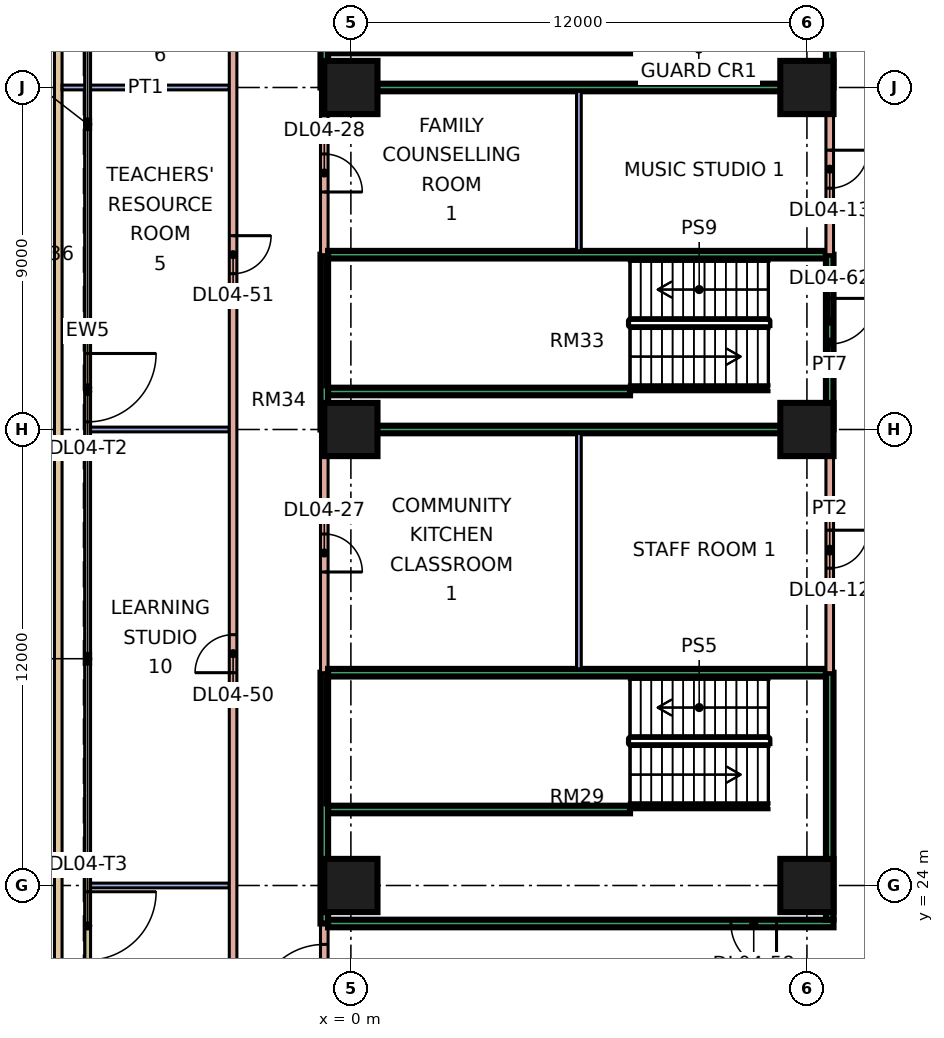
"""IFC4 building model, lengths in metres.
Left out: names, types, materials, properties, quantities, classifications, styles, units other than length and angle.
Written with IfcOpenShell. Run it as: python <this file> out.ifc"""

import sys

from ifc_helpers import new_model, si_unit, direction, frame, frame_2d, origin, origin_2d, place, context, subcontext, project, spatial, rectangle, extrude, element, fill, save


model = new_model("IFC4")
c1 = context("Model", 3, precision=1e-05, world=origin(), true_north=direction((0.0, 1.0)))
c2 = subcontext(c1, "Body", "Model", "MODEL_VIEW")
j1 = project(units=[si_unit("LENGTHUNIT", "METRE"), si_unit("PLANEANGLEUNIT", "RADIAN")], contexts=[c1])
p1 = place(None, origin())
s1 = spatial("IfcSite", under=j1, at=p1, CompositionType="ELEMENT")
p2 = place(p1, origin())
s2 = spatial("IfcBuilding", under=s1, at=p2, CompositionType="ELEMENT")
p3 = place(p2, frame((0.0, 0.0, 21.6)))
s3 = spatial("IfcBuildingStorey", under=s2, at=p3, CompositionType="ELEMENT", Elevation=21.6)
for number, where, z_axis, x_axis in (
    (1, (0.0, 24.0, 0.0), (0.0, 0.0, 1.0), (1.0, 0.0, 0.0)),
    (2, (12.0, 24.0, 0.0), (0.0, 0.0, 1.0), (1.0, 0.0, 0.0)),
    (3, (0.0, 36.0, 0.0), (0.0, 0.0, 1.0), (1.0, 0.0, 0.0)),
    (4, (12.0, 36.0, 0.0), (0.0, 0.0, 1.0), (1.0, 0.0, 0.0)),
    (5, (0.0, 45.0, 0.0), (0.0, 0.0, 1.0), (1.0, 0.0, 0.0)),
    (6, (12.0, 45.0, 0.0), (0.0, 0.0, 1.0), (1.0, 0.0, 0.0)),
):
    element("IfcColumn", number, at=place(p3, frame(where, z_axis=z_axis, x_axis=x_axis)), inside=s3, PredefinedType="COLUMN", context=c2, shape_type="SweptSolid", body=[
        extrude(rectangle(XDim=1.4, YDim=1.4, at=origin_2d()), origin(), (0.0, 0.0, 1.0), 4.8),
    ])
p4 = place(p3, frame((-6.925, 38.5, 0.0), z_axis=(0.0, 0.0, 1.0), x_axis=(0.0, -1.0, 0.0)))
e7 = element("IfcWall", 7, at=p4, inside=s3, PredefinedType="SOLIDWALL", context=c2, shape_type="SweptSolid", body=[
    extrude(rectangle(XDim=3.0, YDim=0.15, at=frame_2d((1.5, 0.0))), origin(), (0.0, 0.0, 1.0), 4.4),
])
p5 = place(p4, frame((0.5, 0.0, 0.0)))
e8 = element("IfcOpeningElement", 8, at=p5, cuts=e7, PredefinedType="OPENING", context=c2, shape_type="SweptSolid", body=[
    extrude(rectangle(XDim=1.8, YDim=2.4, at=frame_2d((0.9, 1.2))), frame((0.0, 0.085, 0.0), z_axis=(0.0, -1.0, 0.0), x_axis=(1.0, 0.0, 0.0)), (0.0, 0.0, 1.0), 0.17),
])
p6 = place(p3, frame((-6.925, 24.436, 0.0), z_axis=(0.0, 0.0, 1.0), x_axis=(0.0, -1.0, 0.0)))
e9 = element("IfcWall", 9, at=p6, inside=s3, PredefinedType="SOLIDWALL", context=c2, shape_type="SweptSolid", body=[
    extrude(rectangle(XDim=3.0, YDim=0.15, at=frame_2d((1.5, 0.0))), origin(), (0.0, 0.0, 1.0), 4.4),
])
p7 = place(p6, frame((0.6, 0.0, 0.0)))
e10 = element("IfcOpeningElement", 10, at=p7, cuts=e9, PredefinedType="OPENING", context=c2, shape_type="SweptSolid", body=[
    extrude(rectangle(XDim=1.8, YDim=2.4, at=frame_2d((0.9, 1.2))), frame((0.0, 0.085, 0.0), z_axis=(0.0, -1.0, 0.0), x_axis=(1.0, 0.0, 0.0)), (0.0, 0.0, 1.0), 0.17),
])
p8 = place(p3, frame((-7.7, 9.932, 0.0), z_axis=(0.0, 0.0, 1.0), x_axis=(0.0, 1.0, 0.0)))
e11 = element("IfcWall", 11, at=p8, inside=s3, PredefinedType="PARAPET", context=c2, shape_type="SweptSolid", body=[
    extrude(rectangle(XDim=54.136, YDim=0.2, at=frame_2d((27.068, 0.0))), origin(), (0.0, 0.0, 1.0), 0.5),
])
p9 = place(p3, frame((-7.6, 45.0, 0.0), z_axis=(0.0, 0.0, 1.0), x_axis=(1.0, 0.0, 0.0)))
e12 = element("IfcWall", 12, at=p9, inside=s3, PredefinedType="PARTITIONING", context=c2, shape_type="SweptSolid", body=[
    extrude(rectangle(XDim=4.4, YDim=0.125, at=frame_2d((2.2, 0.0))), origin(), (0.0, 0.0, 1.0), 4.4),
])
for number, where, z_axis, x_axis in (
    (13, (-6.851, 24.0, 0.0), (0.0, 0.0, 1.0), (1.0, 0.0, 0.0)),
    (14, (-6.851, 36.0, 0.0), (0.0, 0.0, 1.0), (1.0, 0.0, 0.0)),
):
    element("IfcWall", number, at=place(p3, frame(where, z_axis=z_axis, x_axis=x_axis)), inside=s3, PredefinedType="PARTITIONING", context=c2, shape_type="SweptSolid", body=[
        extrude(rectangle(XDim=3.651, YDim=0.125, at=frame_2d((1.826, 0.0))), origin(), (0.0, 0.0, 1.0), 4.4),
    ])
p10 = place(p3, frame((-3.1, 5.473, 0.0), z_axis=(0.0, 0.0, 1.0), x_axis=(0.0, 1.0, 0.0)))
e15 = element("IfcWall", 15, at=p10, inside=s3, PredefinedType="PARTITIONING", context=c2, shape_type="SweptSolid", body=[
    extrude(rectangle(XDim=60.727, YDim=0.2, at=frame_2d((30.363, 0.0))), origin(), (0.0, 0.0, 1.0), 4.4),
])
p11 = place(p10, frame((12.127, 0.0, 0.0)))
e16 = element("IfcOpeningElement", 16, at=p11, cuts=e15, PredefinedType="OPENING", context=c2, shape_type="SweptSolid", body=[
    extrude(rectangle(XDim=1.0, YDim=2.1, at=frame_2d((0.5, 1.05))), frame((0.0, 0.11, 0.0), z_axis=(0.0, -1.0, 0.0), x_axis=(1.0, 0.0, 0.0)), (0.0, 0.0, 1.0), 0.22),
])
p12 = place(p10, frame((24.127, 0.0, 0.0)))
e17 = element("IfcOpeningElement", 17, at=p12, cuts=e15, PredefinedType="OPENING", context=c2, shape_type="SweptSolid", body=[
    extrude(rectangle(XDim=1.0, YDim=2.1, at=frame_2d((0.5, 1.05))), frame((0.0, 0.11, 0.0), z_axis=(0.0, -1.0, 0.0), x_axis=(1.0, 0.0, 0.0)), (0.0, 0.0, 1.0), 0.22),
])
p13 = place(p10, frame((34.627, 0.0, 0.0)))
e18 = element("IfcOpeningElement", 18, at=p13, cuts=e15, PredefinedType="OPENING", context=c2, shape_type="SweptSolid", body=[
    extrude(rectangle(XDim=1.0, YDim=2.1, at=frame_2d((0.5, 1.05))), frame((0.0, 0.11, 0.0), z_axis=(0.0, -1.0, 0.0), x_axis=(1.0, 0.0, 0.0)), (0.0, 0.0, 1.0), 0.22),
])
p14 = place(p10, frame((43.627, 0.0, 0.0)))
e19 = element("IfcOpeningElement", 19, at=p14, cuts=e15, PredefinedType="OPENING", context=c2, shape_type="SweptSolid", body=[
    extrude(rectangle(XDim=1.0, YDim=2.1, at=frame_2d((0.5, 1.05))), frame((0.0, 0.11, 0.0), z_axis=(0.0, -1.0, 0.0), x_axis=(1.0, 0.0, 0.0)), (0.0, 0.0, 1.0), 0.22),
])
p15 = place(p10, frame((52.627, 0.0, 0.0)))
e20 = element("IfcOpeningElement", 20, at=p15, cuts=e15, PredefinedType="OPENING", context=c2, shape_type="SweptSolid", body=[
    extrude(rectangle(XDim=1.0, YDim=2.1, at=frame_2d((0.5, 1.05))), frame((0.0, 0.11, 0.0), z_axis=(0.0, -1.0, 0.0), x_axis=(1.0, 0.0, 0.0)), (0.0, 0.0, 1.0), 0.22),
])
p16 = place(p3, frame((-0.7, 3.073, 0.0), z_axis=(0.0, 0.0, 1.0), x_axis=(0.0, 1.0, 0.0)))
e21 = element("IfcWall", 21, at=p16, inside=s3, PredefinedType="PARTITIONING", context=c2, shape_type="SweptSolid", body=[
    extrude(rectangle(XDim=19.927, YDim=0.2, at=frame_2d((9.963, 0.0))), origin(), (0.0, 0.0, 1.0), 4.4),
])
p17 = place(p16, frame((17.577, 0.0, 0.0)))
e22 = element("IfcOpeningElement", 22, at=p17, cuts=e21, PredefinedType="OPENING", context=c2, shape_type="SweptSolid", body=[
    extrude(rectangle(XDim=1.8, YDim=2.1, at=frame_2d((0.9, 1.05))), frame((0.0, 0.11, 0.0), z_axis=(0.0, -1.0, 0.0), x_axis=(1.0, 0.0, 0.0)), (0.0, 0.0, 1.0), 0.22),
])
p18 = place(p16, frame((9.827, 0.0, 0.0)))
e23 = element("IfcOpeningElement", 23, at=p18, cuts=e21, PredefinedType="OPENING", context=c2, shape_type="SweptSolid", body=[
    extrude(rectangle(XDim=1.0, YDim=2.1, at=frame_2d((0.5, 1.05))), frame((0.0, 0.11, 0.0), z_axis=(0.0, -1.0, 0.0), x_axis=(1.0, 0.0, 0.0)), (0.0, 0.0, 1.0), 0.22),
])
p19 = place(p3, frame((-0.7, 23.0, 0.0), z_axis=(0.0, 0.0, 1.0), x_axis=(0.0, 1.0, 0.0)))
e24 = element("IfcWall", 24, at=p19, inside=s3, PredefinedType="SOLIDWALL", context=c2, shape_type="SweptSolid", body=[
    extrude(rectangle(XDim=6.6, YDim=0.2, at=frame_2d((3.3, 0.0))), origin(), (0.0, 0.0, 1.0), 4.4),
])
p20 = place(p3, frame((-0.7, 29.6, 0.0), z_axis=(0.0, 0.0, 1.0), x_axis=(0.0, 1.0, 0.0)))
e25 = element("IfcWall", 25, at=p20, inside=s3, PredefinedType="PARTITIONING", context=c2, shape_type="SweptSolid", body=[
    extrude(rectangle(XDim=6.4, YDim=0.2, at=frame_2d((3.2, 0.0))), origin(), (0.0, 0.0, 1.0), 4.4),
])
p21 = place(p20, frame((2.65, 0.0, 0.0)))
e26 = element("IfcOpeningElement", 26, at=p21, cuts=e25, PredefinedType="OPENING", context=c2, shape_type="SweptSolid", body=[
    extrude(rectangle(XDim=1.0, YDim=2.1, at=frame_2d((0.5, 1.05))), frame((0.0, 0.11, 0.0), z_axis=(0.0, -1.0, 0.0), x_axis=(1.0, 0.0, 0.0)), (0.0, 0.0, 1.0), 0.22),
])
p22 = place(p3, frame((-0.7, 36.0, 0.0), z_axis=(0.0, 0.0, 1.0), x_axis=(0.0, 1.0, 0.0)))
e27 = element("IfcWall", 27, at=p22, inside=s3, PredefinedType="SOLIDWALL", context=c2, shape_type="SweptSolid", body=[
    extrude(rectangle(XDim=4.6, YDim=0.2, at=frame_2d((2.3, 0.0))), origin(), (0.0, 0.0, 1.0), 4.4),
])
p23 = place(p3, frame((-0.7, 40.6, 0.0), z_axis=(0.0, 0.0, 1.0), x_axis=(0.0, 1.0, 0.0)))
e28 = element("IfcWall", 28, at=p23, inside=s3, PredefinedType="PARTITIONING", context=c2, shape_type="SweptSolid", body=[
    extrude(rectangle(XDim=4.4, YDim=0.2, at=frame_2d((2.2, 0.0))), origin(), (0.0, 0.0, 1.0), 4.4),
])
p24 = place(p23, frame((1.65, 0.0, 0.0)))
e29 = element("IfcOpeningElement", 29, at=p24, cuts=e28, PredefinedType="OPENING", context=c2, shape_type="SweptSolid", body=[
    extrude(rectangle(XDim=1.0, YDim=2.1, at=frame_2d((0.5, 1.05))), frame((0.0, 0.11, 0.0), z_axis=(0.0, -1.0, 0.0), x_axis=(1.0, 0.0, 0.0)), (0.0, 0.0, 1.0), 0.22),
])
p25 = place(p3, frame((-0.7, 45.0, 0.0), z_axis=(0.0, 0.0, 1.0), x_axis=(0.0, 1.0, 0.0)))
e30 = element("IfcWall", 30, at=p25, inside=s3, PredefinedType="SOLIDWALL", context=c2, shape_type="SweptSolid", body=[
    extrude(rectangle(XDim=4.6, YDim=0.2, at=frame_2d((2.3, 0.0))), origin(), (0.0, 0.0, 1.0), 4.4),
])
p26 = place(p3, frame((-0.6, 23.0, 0.0), z_axis=(0.0, 0.0, 1.0), x_axis=(1.0, 0.0, 0.0)))
e31 = element("IfcWall", 31, at=p26, inside=s3, PredefinedType="SOLIDWALL", context=c2, shape_type="SweptSolid", body=[
    extrude(rectangle(XDim=13.3, YDim=0.2, at=frame_2d((6.65, 0.0))), origin(), (0.0, 0.0, 1.0), 4.4),
])
p27 = place(p26, frame((10.6, 0.0, 0.0)))
e32 = element("IfcOpeningElement", 32, at=p27, cuts=e31, PredefinedType="OPENING", context=c2, shape_type="SweptSolid", body=[
    extrude(rectangle(XDim=1.2, YDim=2.1, at=frame_2d((0.6, 1.05))), frame((0.0, 0.11, 0.0), z_axis=(0.0, -1.0, 0.0), x_axis=(1.0, 0.0, 0.0)), (0.0, 0.0, 1.0), 0.22),
])
for number, where, z_axis, x_axis in (
    (33, (-0.6, 29.6, 0.0), (0.0, 0.0, 1.0), (1.0, 0.0, 0.0)),
    (34, (-0.6, 36.0, 0.0), (0.0, 0.0, 1.0), (1.0, 0.0, 0.0)),
    (35, (-0.6, 40.6, 0.0), (0.0, 0.0, 1.0), (1.0, 0.0, 0.0)),
    (36, (-0.6, 45.0, 0.0), (0.0, 0.0, 1.0), (1.0, 0.0, 0.0)),
):
    element("IfcWall", number, at=place(p3, frame(where, z_axis=z_axis, x_axis=x_axis)), inside=s3, PredefinedType="SOLIDWALL", context=c2, shape_type="SweptSolid", body=[
        extrude(rectangle(XDim=13.1, YDim=0.2, at=frame_2d((6.55, 0.0))), origin(), (0.0, 0.0, 1.0), 4.4),
    ])
p28 = place(p3, frame((6.0, 29.7, 0.0), z_axis=(0.0, 0.0, 1.0), x_axis=(0.0, 1.0, 0.0)))
e37 = element("IfcWall", 37, at=p28, inside=s3, PredefinedType="PARTITIONING", context=c2, shape_type="SweptSolid", body=[
    extrude(rectangle(XDim=6.2, YDim=0.125, at=frame_2d((3.1, 0.0))), origin(), (0.0, 0.0, 1.0), 4.4),
])
p29 = place(p3, frame((6.0, 40.7, 0.0), z_axis=(0.0, 0.0, 1.0), x_axis=(0.0, 1.0, 0.0)))
e38 = element("IfcWall", 38, at=p29, inside=s3, PredefinedType="PARTITIONING", context=c2, shape_type="SweptSolid", body=[
    extrude(rectangle(XDim=4.2, YDim=0.125, at=frame_2d((2.1, 0.0))), origin(), (0.0, 0.0, 1.0), 4.4),
])
p30 = place(p3, frame((12.6, 23.1, 0.0), z_axis=(0.0, 0.0, 1.0), x_axis=(0.0, 1.0, 0.0)))
e39 = element("IfcWall", 39, at=p30, inside=s3, PredefinedType="SOLIDWALL", context=c2, shape_type="SweptSolid", body=[
    extrude(rectangle(XDim=6.5, YDim=0.2, at=frame_2d((3.25, 0.0))), origin(), (0.0, 0.0, 1.0), 4.4),
])
p31 = place(p3, frame((12.6, 29.6, 0.0), z_axis=(0.0, 0.0, 1.0), x_axis=(0.0, 1.0, 0.0)))
e40 = element("IfcWall", 40, at=p31, inside=s3, PredefinedType="PARTITIONING", context=c2, shape_type="SweptSolid", body=[
    extrude(rectangle(XDim=6.4, YDim=0.2, at=frame_2d((3.2, 0.0))), origin(), (0.0, 0.0, 1.0), 4.4),
])
p32 = place(p31, frame((2.75, 0.0, 0.0)))
e41 = element("IfcOpeningElement", 41, at=p32, cuts=e40, PredefinedType="OPENING", context=c2, shape_type="SweptSolid", body=[
    extrude(rectangle(XDim=1.0, YDim=2.1, at=frame_2d((0.5, 1.05))), frame((0.0, 0.11, 0.0), z_axis=(0.0, -1.0, 0.0), x_axis=(1.0, 0.0, 0.0)), (0.0, 0.0, 1.0), 0.22),
])
p33 = place(p3, frame((12.6, 36.0, 0.0), z_axis=(0.0, 0.0, 1.0), x_axis=(0.0, 1.0, 0.0)))
e42 = element("IfcWall", 42, at=p33, inside=s3, PredefinedType="SOLIDWALL", context=c2, shape_type="SweptSolid", body=[
    extrude(rectangle(XDim=4.6, YDim=0.2, at=frame_2d((2.3, 0.0))), origin(), (0.0, 0.0, 1.0), 4.4),
])
p34 = place(p33, frame((2.25, 0.0, 0.0)))
e43 = element("IfcOpeningElement", 43, at=p34, cuts=e42, PredefinedType="OPENING", context=c2, shape_type="SweptSolid", body=[
    extrude(rectangle(XDim=1.2, YDim=2.1, at=frame_2d((0.6, 1.05))), frame((0.0, 0.11, 0.0), z_axis=(0.0, -1.0, 0.0), x_axis=(1.0, 0.0, 0.0)), (0.0, 0.0, 1.0), 0.22),
])
p35 = place(p3, frame((12.6, 40.6, 0.0), z_axis=(0.0, 0.0, 1.0), x_axis=(0.0, 1.0, 0.0)))
e44 = element("IfcWall", 44, at=p35, inside=s3, PredefinedType="PARTITIONING", context=c2, shape_type="SweptSolid", body=[
    extrude(rectangle(XDim=4.4, YDim=0.2, at=frame_2d((2.2, 0.0))), origin(), (0.0, 0.0, 1.0), 4.4),
])
p36 = place(p35, frame((1.75, 0.0, 0.0)))
e45 = element("IfcOpeningElement", 45, at=p36, cuts=e44, PredefinedType="OPENING", context=c2, shape_type="SweptSolid", body=[
    extrude(rectangle(XDim=1.0, YDim=2.1, at=frame_2d((0.5, 1.05))), frame((0.0, 0.11, 0.0), z_axis=(0.0, -1.0, 0.0), x_axis=(1.0, 0.0, 0.0)), (0.0, 0.0, 1.0), 0.22),
])
p37 = place(p3, frame((12.6, 45.0, 0.0), z_axis=(0.0, 0.0, 1.0), x_axis=(0.0, 1.0, 0.0)))
e46 = element("IfcWall", 46, at=p37, inside=s3, PredefinedType="SOLIDWALL", context=c2, shape_type="SweptSolid", body=[
    extrude(rectangle(XDim=4.6, YDim=0.2, at=frame_2d((2.3, 0.0))), origin(), (0.0, 0.0, 1.0), 4.4),
])
p38 = place(p37, frame((2.25, 0.0, 0.0)))
e47 = element("IfcOpeningElement", 47, at=p38, cuts=e46, PredefinedType="OPENING", context=c2, shape_type="SweptSolid", body=[
    extrude(rectangle(XDim=1.2, YDim=2.1, at=frame_2d((0.6, 1.05))), frame((0.0, 0.11, 0.0), z_axis=(0.0, -1.0, 0.0), x_axis=(1.0, 0.0, 0.0)), (0.0, 0.0, 1.0), 0.22),
])
for number, where, z_axis, x_axis in (
    (48, (-0.6, 46.0, 0.0), (0.0, 0.0, 1.0), (1.0, 0.0, 0.0)),
    (49, (-0.6, 26.0, 0.0), (0.0, 0.0, 1.0), (1.0, 0.0, 0.0)),
    (50, (-0.6, 37.0, 0.0), (0.0, 0.0, 1.0), (1.0, 0.0, 0.0)),
):
    element("IfcWall", number, at=place(p3, frame(where, z_axis=z_axis, x_axis=x_axis)), inside=s3, PredefinedType="SOLIDWALL", context=c2, shape_type="SweptSolid", body=[
        extrude(rectangle(XDim=7.945, YDim=0.2, at=frame_2d((3.973, 0.0))), origin(), (0.0, 0.0, 1.0), 4.4),
    ])
p39 = place(p5, origin())
e51 = element("IfcDoor", 51, at=p39, inside=s3, OperationType="DOUBLE_DOOR_SINGLE_SWING", PredefinedType="DOOR", context=c2, shape_type="SweptSolid", body=[
    extrude(rectangle(XDim=1.8, YDim=2.4, at=frame_2d((0.9, 1.2))), frame((0.0, 0.025, 0.0), z_axis=(0.0, -1.0, 0.0), x_axis=(1.0, 0.0, 0.0)), (0.0, 0.0, 1.0), 0.05),
])
fill(e8, e51)
p40 = place(p7, origin())
e52 = element("IfcDoor", 52, at=p40, inside=s3, OperationType="DOUBLE_DOOR_SINGLE_SWING", PredefinedType="DOOR", context=c2, shape_type="SweptSolid", body=[
    extrude(rectangle(XDim=1.8, YDim=2.4, at=frame_2d((0.9, 1.2))), frame((0.0, 0.025, 0.0), z_axis=(0.0, -1.0, 0.0), x_axis=(1.0, 0.0, 0.0)), (0.0, 0.0, 1.0), 0.05),
])
fill(e10, e52)
p41 = place(p32, origin())
e53 = element("IfcDoor", 53, at=p41, inside=s3, OperationType="SINGLE_SWING_RIGHT", PredefinedType="DOOR", context=c2, shape_type="SweptSolid", body=[
    extrude(rectangle(XDim=1.0, YDim=2.1, at=frame_2d((0.5, 1.05))), frame((0.0, 0.025, 0.0), z_axis=(0.0, -1.0, 0.0), x_axis=(1.0, 0.0, 0.0)), (0.0, 0.0, 1.0), 0.05),
])
fill(e41, e53)
p42 = place(p36, origin())
e54 = element("IfcDoor", 54, at=p42, inside=s3, OperationType="SINGLE_SWING_RIGHT", PredefinedType="DOOR", context=c2, shape_type="SweptSolid", body=[
    extrude(rectangle(XDim=1.0, YDim=2.1, at=frame_2d((0.5, 1.05))), frame((0.0, 0.025, 0.0), z_axis=(0.0, -1.0, 0.0), x_axis=(1.0, 0.0, 0.0)), (0.0, 0.0, 1.0), 0.05),
])
fill(e45, e54)
p43 = place(p21, frame((1.0, 0.0, 0.0), z_axis=(0.0, 0.0, 1.0), x_axis=(-1.0, 0.0, 0.0)))
e55 = element("IfcDoor", 55, at=p43, inside=s3, OperationType="SINGLE_SWING_LEFT", PredefinedType="DOOR", context=c2, shape_type="SweptSolid", body=[
    extrude(rectangle(XDim=1.0, YDim=2.1, at=frame_2d((0.5, 1.05))), frame((0.0, 0.025, 0.0), z_axis=(0.0, -1.0, 0.0), x_axis=(1.0, 0.0, 0.0)), (0.0, 0.0, 1.0), 0.05),
])
fill(e26, e55)
p44 = place(p24, frame((1.0, 0.0, 0.0), z_axis=(0.0, 0.0, 1.0), x_axis=(-1.0, 0.0, 0.0)))
e56 = element("IfcDoor", 56, at=p44, inside=s3, OperationType="SINGLE_SWING_LEFT", PredefinedType="DOOR", context=c2, shape_type="SweptSolid", body=[
    extrude(rectangle(XDim=1.0, YDim=2.1, at=frame_2d((0.5, 1.05))), frame((0.0, 0.025, 0.0), z_axis=(0.0, -1.0, 0.0), x_axis=(1.0, 0.0, 0.0)), (0.0, 0.0, 1.0), 0.05),
])
fill(e29, e56)
p45 = place(p17, origin())
e57 = element("IfcDoor", 57, at=p45, inside=s3, OperationType="DOUBLE_DOOR_SINGLE_SWING", PredefinedType="DOOR", context=c2, shape_type="SweptSolid", body=[
    extrude(rectangle(XDim=1.8, YDim=2.1, at=frame_2d((0.9, 1.05))), frame((0.0, 0.025, 0.0), z_axis=(0.0, -1.0, 0.0), x_axis=(1.0, 0.0, 0.0)), (0.0, 0.0, 1.0), 0.05),
])
fill(e22, e57)
p46 = place(p12, origin())
e58 = element("IfcDoor", 58, at=p46, inside=s3, OperationType="SINGLE_SWING_LEFT", PredefinedType="DOOR", context=c2, shape_type="SweptSolid", body=[
    extrude(rectangle(XDim=1.0, YDim=2.1, at=frame_2d((0.5, 1.05))), frame((0.0, 0.025, 0.0), z_axis=(0.0, -1.0, 0.0), x_axis=(1.0, 0.0, 0.0)), (0.0, 0.0, 1.0), 0.05),
])
fill(e17, e58)
p47 = place(p13, origin())
e59 = element("IfcDoor", 59, at=p47, inside=s3, OperationType="SINGLE_SWING_RIGHT", PredefinedType="DOOR", context=c2, shape_type="SweptSolid", body=[
    extrude(rectangle(XDim=1.0, YDim=2.1, at=frame_2d((0.5, 1.05))), frame((0.0, 0.025, 0.0), z_axis=(0.0, -1.0, 0.0), x_axis=(1.0, 0.0, 0.0)), (0.0, 0.0, 1.0), 0.05),
])
fill(e18, e59)
p48 = place(p27, origin())
e60 = element("IfcDoor", 60, at=p48, inside=s3, OperationType="SINGLE_SWING_RIGHT", PredefinedType="DOOR", context=c2, shape_type="SweptSolid", body=[
    extrude(rectangle(XDim=1.2, YDim=2.1, at=frame_2d((0.6, 1.05))), frame((0.0, 0.025, 0.0), z_axis=(0.0, -1.0, 0.0), x_axis=(1.0, 0.0, 0.0)), (0.0, 0.0, 1.0), 0.05),
])
fill(e32, e60)
p49 = place(p34, origin())
e61 = element("IfcDoor", 61, at=p49, inside=s3, OperationType="SINGLE_SWING_RIGHT", PredefinedType="DOOR", context=c2, shape_type="SweptSolid", body=[
    extrude(rectangle(XDim=1.2, YDim=2.1, at=frame_2d((0.6, 1.05))), frame((0.0, 0.025, 0.0), z_axis=(0.0, -1.0, 0.0), x_axis=(1.0, 0.0, 0.0)), (0.0, 0.0, 1.0), 0.05),
])
fill(e43, e61)
save(model, sys.argv[1])
